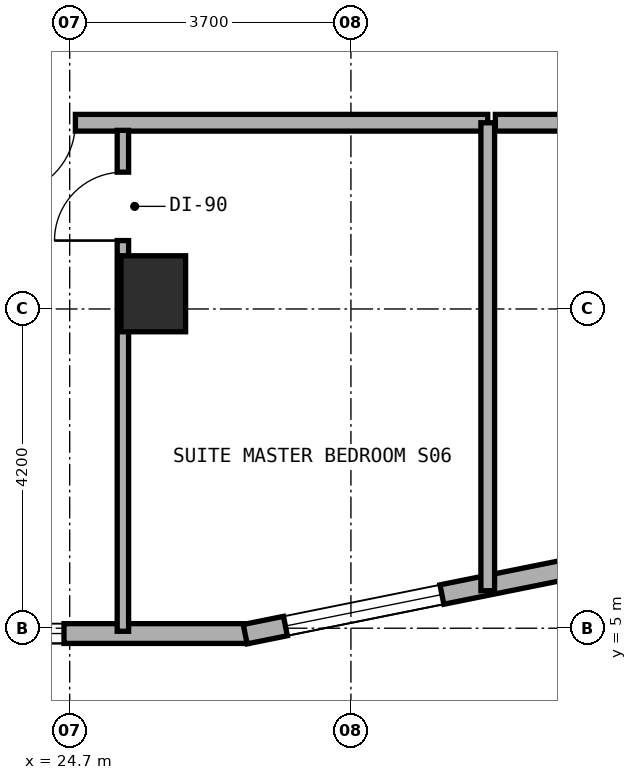
"""IFC4 building model, lengths in metres.
Left out: names, types, materials, properties, quantities, classifications, styles, units other than length and angle.
Written with IfcOpenShell. Run it as: python <this file> out.ifc"""

import sys

from ifc_helpers import new_model, si_unit, direction, frame, frame_2d, origin, origin_2d, place, context, subcontext, project, spatial, rectangle, extrude, element, fill, save


model = new_model("IFC4")
c1 = context("Model", 3, precision=1e-05, world=origin(), true_north=direction((0.0, 1.0)))
c2 = subcontext(c1, "Body", "Model", "MODEL_VIEW")
j1 = project(units=[si_unit("LENGTHUNIT", "METRE"), si_unit("PLANEANGLEUNIT", "RADIAN")], contexts=[c1])
p1 = place(None, origin())
s1 = spatial("IfcSite", under=j1, at=p1, CompositionType="ELEMENT")
p2 = place(p1, origin())
s2 = spatial("IfcBuilding", under=s1, at=p2, CompositionType="ELEMENT")
p3 = place(p2, frame((0.0, 0.0, 134.5)))
s3 = spatial("IfcBuildingStorey", under=s2, at=p3, CompositionType="ELEMENT", Elevation=134.5)
p4 = place(p3, frame((25.8, 9.4, 0.0), z_axis=(0.0, 0.0, 1.0), x_axis=(1.0, 0.0, 0.0)))
e1 = element("IfcColumn", 1, at=p4, inside=s3, PredefinedType="COLUMN", context=c2, shape_type="SweptSolid", body=[
    extrude(rectangle(XDim=0.85, YDim=1.0, at=origin_2d()), origin(), (0.0, 0.0, 1.0), 3.5),
])
p5 = place(p3, frame((14.915, 4.93, 0.0), z_axis=(0.0, 0.0, 1.0), x_axis=(1.0, 0.0, 0.0)))
e2 = element("IfcWall", 2, at=p5, inside=s3, PredefinedType="STANDARD", context=c2, shape_type="SweptSolid", body=[
    extrude(rectangle(XDim=12.135, YDim=0.26, at=frame_2d((6.067, 0.0))), origin(), (0.0, 0.0, 1.0), 3.22),
])
p6 = place(p5, frame((5.485, 0.0, 0.0)))
e3 = element("IfcOpeningElement", 3, at=p6, cuts=e2, PredefinedType="OPENING", context=c2, shape_type="SweptSolid", body=[
    extrude(rectangle(XDim=1.2, YDim=2.15, at=frame_2d((0.6, 1.075))), frame((0.0, 0.14, 0.0), z_axis=(0.0, -1.0, 0.0), x_axis=(1.0, 0.0, 0.0)), (0.0, 0.0, 1.0), 0.28),
])
p7 = place(p5, frame((2.26, 0.0, 0.85)))
e4 = element("IfcOpeningElement", 4, at=p7, cuts=e2, PredefinedType="OPENING", context=c2, shape_type="SweptSolid", body=[
    extrude(rectangle(XDim=2.1, YDim=1.5, at=frame_2d((1.05, 0.75))), frame((0.0, 0.14, 0.0), z_axis=(0.0, -1.0, 0.0), x_axis=(1.0, 0.0, 0.0)), (0.0, 0.0, 1.0), 0.28),
])
p8 = place(p5, frame((7.61, 0.0, 0.85)))
e5 = element("IfcOpeningElement", 5, at=p8, cuts=e2, PredefinedType="OPENING", context=c2, shape_type="SweptSolid", body=[
    extrude(rectangle(XDim=2.1, YDim=1.5, at=frame_2d((1.05, 0.75))), frame((0.0, 0.14, 0.0), z_axis=(0.0, -1.0, 0.0), x_axis=(1.0, 0.0, 0.0)), (0.0, 0.0, 1.0), 0.28),
])
p9 = place(p3, frame((27.009, 4.922, 0.0), z_axis=(0.0, 0.0, 1.0), x_axis=(0.980321298532, 0.197408590603, 0.0)))
e6 = element("IfcWall", 6, at=p9, inside=s3, PredefinedType="STANDARD", context=c2, shape_type="SweptSolid", body=[
    extrude(rectangle(XDim=9.153, YDim=0.26, at=frame_2d((4.577, 0.0))), origin(), (0.0, 0.0, 1.0), 3.22),
])
p10 = place(p9, frame((0.54, 0.0, 0.85)))
e7 = element("IfcOpeningElement", 7, at=p10, cuts=e6, PredefinedType="OPENING", context=c2, shape_type="SweptSolid", body=[
    extrude(rectangle(XDim=2.1, YDim=1.5, at=frame_2d((1.05, 0.75))), frame((0.0, 0.14, 0.0), z_axis=(0.0, -1.0, 0.0), x_axis=(1.0, 0.0, 0.0)), (0.0, 0.0, 1.0), 0.28),
])
p11 = place(p9, frame((5.216, 0.0, 0.85)))
e8 = element("IfcOpeningElement", 8, at=p11, cuts=e6, PredefinedType="OPENING", context=c2, shape_type="SweptSolid", body=[
    extrude(rectangle(XDim=2.1, YDim=1.5, at=frame_2d((1.05, 0.75))), frame((0.0, 0.14, 0.0), z_axis=(0.0, -1.0, 0.0), x_axis=(1.0, 0.0, 0.0)), (0.0, 0.0, 1.0), 0.28),
])
p12 = place(p3, frame((18.4, 11.65, 0.0), z_axis=(0.0, 0.0, 1.0), x_axis=(1.0, 0.0, 0.0)))
e9 = element("IfcWall", 9, at=p12, inside=s3, PredefinedType="SOLIDWALL", context=c2, shape_type="SweptSolid", body=[
    extrude(rectangle(XDim=11.8, YDim=0.22, at=frame_2d((5.9, 0.0))), origin(), (0.0, 0.0, 1.0), 2.695),
])
p13 = place(p12, frame((5.425, 0.0, 0.0)))
e10 = element("IfcOpeningElement", 10, at=p13, cuts=e9, PredefinedType="OPENING", context=c2, shape_type="SweptSolid", body=[
    extrude(rectangle(XDim=0.95, YDim=2.1, at=frame_2d((0.475, 1.05))), frame((0.0, 0.12, 0.0), z_axis=(0.0, -1.0, 0.0), x_axis=(1.0, 0.0, 0.0)), (0.0, 0.0, 1.0), 0.24),
])
p14 = place(p3, frame((25.4, 4.96, 0.0), z_axis=(0.0, 0.0, 1.0), x_axis=(0.0, 1.0, 0.0)))
e11 = element("IfcWall", 11, at=p14, inside=s3, PredefinedType="PARTITIONING", context=c2, shape_type="SweptSolid", body=[
    extrude(rectangle(XDim=6.59, YDim=0.15, at=frame_2d((3.295, 0.0))), origin(), (0.0, 0.0, 1.0), 2.835),
])
p15 = place(p14, frame((5.14, 0.0, 0.0)))
e12 = element("IfcOpeningElement", 12, at=p15, cuts=e11, PredefinedType="OPENING", context=c2, shape_type="SweptSolid", body=[
    extrude(rectangle(XDim=0.9, YDim=2.1, at=frame_2d((0.45, 1.05))), frame((0.0, 0.085, 0.0), z_axis=(0.0, -1.0, 0.0), x_axis=(1.0, 0.0, 0.0)), (0.0, 0.0, 1.0), 0.17),
])
p16 = place(p3, frame((30.2, 5.493, 0.0), z_axis=(0.0, 0.0, 1.0), x_axis=(0.0, 1.0, 0.0)))
e13 = element("IfcWall", 13, at=p16, inside=s3, PredefinedType="SOLIDWALL", context=c2, shape_type="SweptSolid", body=[
    extrude(rectangle(XDim=6.157, YDim=0.18, at=frame_2d((3.079, 0.0))), origin(), (0.0, 0.0, 1.0), 2.835),
])
p17 = place(p3, frame((30.3, 11.65, 0.0), z_axis=(0.0, 0.0, 1.0), x_axis=(1.0, 0.0, 0.0)))
e14 = element("IfcWall", 14, at=p17, inside=s3, PredefinedType="SOLIDWALL", context=c2, shape_type="SweptSolid", body=[
    extrude(rectangle(XDim=10.64, YDim=0.22, at=frame_2d((5.32, 0.0))), origin(), (0.0, 0.0, 1.0), 2.695),
])
p18 = place(p17, frame((4.631, 0.0, 0.0)))
e15 = element("IfcOpeningElement", 15, at=p18, cuts=e14, PredefinedType="OPENING", context=c2, shape_type="SweptSolid", body=[
    extrude(rectangle(XDim=0.95, YDim=2.1, at=frame_2d((0.475, 1.05))), frame((0.0, 0.12, 0.0), z_axis=(0.0, -1.0, 0.0), x_axis=(1.0, 0.0, 0.0)), (0.0, 0.0, 1.0), 0.24),
])
p19 = place(p8, origin())
e16 = element("IfcWindow", 16, at=p19, inside=s3, PartitioningType="SINGLE_PANEL", PredefinedType="WINDOW", context=c2, shape_type="SweptSolid", body=[
    extrude(rectangle(XDim=2.1, YDim=1.5, at=frame_2d((1.05, 0.75))), frame((0.0, 0.03, 0.0), z_axis=(0.0, -1.0, 0.0), x_axis=(1.0, 0.0, 0.0)), (0.0, 0.0, 1.0), 0.06),
])
fill(e5, e16)
p20 = place(p10, origin())
e17 = element("IfcWindow", 17, at=p20, inside=s3, PartitioningType="SINGLE_PANEL", PredefinedType="WINDOW", context=c2, shape_type="SweptSolid", body=[
    extrude(rectangle(XDim=2.1, YDim=1.5, at=frame_2d((1.05, 0.75))), frame((0.0, 0.03, 0.0), z_axis=(0.0, -1.0, 0.0), x_axis=(1.0, 0.0, 0.0)), (0.0, 0.0, 1.0), 0.06),
])
fill(e7, e17)
p21 = place(p13, frame((0.95, 0.0, 0.0), z_axis=(0.0, 0.0, 1.0), x_axis=(-1.0, 0.0, 0.0)))
e18 = element("IfcDoor", 18, at=p21, inside=s3, OperationType="SINGLE_SWING_RIGHT", PredefinedType="DOOR", context=c2, shape_type="SweptSolid", body=[
    extrude(rectangle(XDim=0.95, YDim=2.1, at=frame_2d((0.475, 1.05))), frame((0.0, 0.025, 0.0), z_axis=(0.0, -1.0, 0.0), x_axis=(1.0, 0.0, 0.0)), (0.0, 0.0, 1.0), 0.05),
])
fill(e10, e18)
p22 = place(p15, origin())
e19 = element("IfcDoor", 19, at=p22, inside=s3, OperationType="SINGLE_SWING_LEFT", PredefinedType="DOOR", context=c2, shape_type="SweptSolid", body=[
    extrude(rectangle(XDim=0.9, YDim=2.1, at=frame_2d((0.45, 1.05))), frame((0.0, 0.025, 0.0), z_axis=(0.0, -1.0, 0.0), x_axis=(1.0, 0.0, 0.0)), (0.0, 0.0, 1.0), 0.05),
])
fill(e12, e19)
save(model, sys.argv[1])
